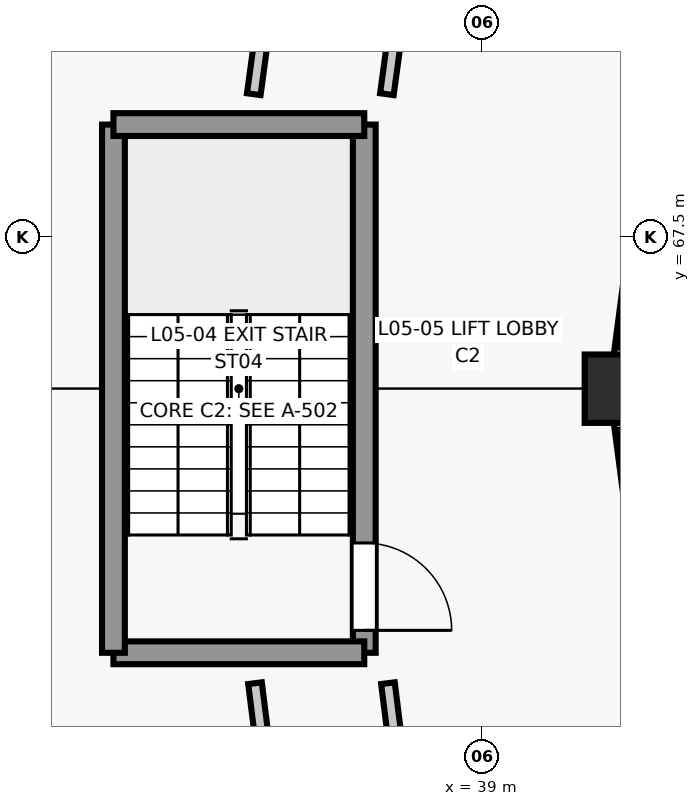
"""IFC4 building model, lengths in metres.
Left out: names, types, materials, properties, quantities, classifications, styles, units other than length and angle.
Written with IfcOpenShell. Run it as: python <this file> out.ifc"""

import sys

from ifc_helpers import new_model, si_unit, direction, frame, frame_2d, origin, origin_2d, place, context, subcontext, project, spatial, rectangle, circle, extrude, element, fill, save


model = new_model("IFC4")
c1 = context("Model", 3, precision=1e-05, world=origin(), true_north=direction((0.0, 1.0)))
c2 = subcontext(c1, "Body", "Model", "MODEL_VIEW")
j1 = project(units=[si_unit("LENGTHUNIT", "METRE"), si_unit("PLANEANGLEUNIT", "RADIAN")], contexts=[c1])
p1 = place(None, origin())
s1 = spatial("IfcSite", under=j1, at=p1, CompositionType="ELEMENT")
p2 = place(p1, origin())
s2 = spatial("IfcBuilding", under=s1, at=p2, CompositionType="ELEMENT")
p3 = place(p2, frame((0.0, 0.0, 20.4)))
s3 = spatial("IfcBuildingStorey", under=s2, at=p3, CompositionType="ELEMENT", Elevation=20.4)
p4 = place(p3, frame((40.8, 65.5, 0.0), z_axis=(0.0, 0.0, 1.0), x_axis=(1.0, 0.0, 0.0)))
e1 = element("IfcColumn", 1, at=p4, inside=s3, PredefinedType="COLUMN", context=c2, shape_type="SweptSolid", body=[
    extrude(circle(Radius=0.45, at=origin_2d()), origin(), (0.0, 0.0, 1.0), 3.9),
])
p5 = place(p3, frame((31.963, 65.975, 0.0), z_axis=(0.0, 0.0, 1.0), x_axis=(0.130513242145, 0.991446566197, 0.0)))
e2 = element("IfcWall", 2, at=p5, inside=s3, PredefinedType="STANDARD", context=c2, shape_type="SweptSolid", body=[
    extrude(rectangle(XDim=11.076, YDim=0.28, at=frame_2d((5.538, 0.0))), origin(), (0.0, 0.0, 1.0), 0.82),
])
p6 = place(p3, frame((42.031, 74.853, 0.0), z_axis=(0.0, 0.0, 1.0), x_axis=(-0.130549698469, -0.991441766434, 0.0)))
e3 = element("IfcWall", 3, at=p6, inside=s3, PredefinedType="STANDARD", context=c2, shape_type="SweptSolid", body=[
    extrude(rectangle(XDim=9.156, YDim=0.25, at=frame_2d((4.578, 0.0))), origin(), (0.0, 0.0, 1.0), 0.82),
])
p7 = place(p3, frame((33.408, 54.044, 0.0), z_axis=(0.0, 0.0, 1.0), x_axis=(-0.130513242145, 0.991446566197, 0.0)))
e4 = element("IfcWall", 4, at=p7, inside=s3, PredefinedType="STANDARD", context=c2, shape_type="SweptSolid", body=[
    extrude(rectangle(XDim=11.076, YDim=0.28, at=frame_2d((5.538, 0.0))), origin(), (0.0, 0.0, 1.0), 2.846),
])
p8 = place(p7, frame((4.163, 0.0, 0.85)))
e5 = element("IfcOpeningElement", 5, at=p8, cuts=e4, PredefinedType="OPENING", context=c2, shape_type="SweptSolid", body=[
    extrude(rectangle(XDim=2.75, YDim=1.75, at=frame_2d((1.375, 0.875))), frame((0.0, 0.15, 0.0), z_axis=(0.0, -1.0, 0.0), x_axis=(1.0, 0.0, 0.0)), (0.0, 0.0, 1.0), 0.3),
])
p9 = place(p3, frame((40.836, 65.225, 0.0), z_axis=(0.0, 0.0, 1.0), x_axis=(0.130549698469, -0.991441766434, 0.0)))
e6 = element("IfcWall", 6, at=p9, inside=s3, PredefinedType="STANDARD", context=c2, shape_type="SweptSolid", body=[
    extrude(rectangle(XDim=9.156, YDim=0.25, at=frame_2d((4.578, 0.0))), origin(), (0.0, 0.0, 1.0), 0.82),
])
p10 = place(p3, frame((37.45, 68.975, 0.0), z_axis=(0.0, 0.0, 1.0), x_axis=(0.0, -1.0, 0.0)))
e7 = element("IfcWall", 7, at=p10, inside=s3, PredefinedType="SHEAR", context=c2, shape_type="SweptSolid", body=[
    extrude(rectangle(XDim=6.95, YDim=0.3, at=frame_2d((3.475, 0.0))), origin(), (0.0, 0.0, 1.0), 3.9),
])
p11 = place(p10, frame((5.505, 0.0, 0.0)))
e8 = element("IfcOpeningElement", 8, at=p11, cuts=e7, PredefinedType="OPENING", context=c2, shape_type="SweptSolid", body=[
    extrude(rectangle(XDim=1.15, YDim=2.15, at=frame_2d((0.575, 1.075))), frame((0.0, 0.16, 0.0), z_axis=(0.0, -1.0, 0.0), x_axis=(1.0, 0.0, 0.0)), (0.0, 0.0, 1.0), 0.32),
])
p12 = place(p3, frame((37.45, 62.025, 0.0), z_axis=(0.0, 0.0, 1.0), x_axis=(-1.0, 0.0, 0.0)))
e9 = element("IfcWall", 9, at=p12, inside=s3, PredefinedType="SHEAR", context=c2, shape_type="SweptSolid", body=[
    extrude(rectangle(XDim=3.3, YDim=0.3, at=frame_2d((1.65, 0.0))), origin(), (0.0, 0.0, 1.0), 3.9),
])
p13 = place(p3, frame((34.15, 62.025, 0.0), z_axis=(0.0, 0.0, 1.0), x_axis=(0.0, 1.0, 0.0)))
e10 = element("IfcWall", 10, at=p13, inside=s3, PredefinedType="SHEAR", context=c2, shape_type="SweptSolid", body=[
    extrude(rectangle(XDim=6.95, YDim=0.3, at=frame_2d((3.475, 0.0))), origin(), (0.0, 0.0, 1.0), 3.9),
])
p14 = place(p3, frame((34.15, 68.975, 0.0), z_axis=(0.0, 0.0, 1.0), x_axis=(1.0, 0.0, 0.0)))
e11 = element("IfcWall", 11, at=p14, inside=s3, PredefinedType="SHEAR", context=c2, shape_type="SweptSolid", body=[
    extrude(rectangle(XDim=3.3, YDim=0.3, at=frame_2d((1.65, 0.0))), origin(), (0.0, 0.0, 1.0), 3.9),
])
p15 = place(p3, frame((36.976, 76.602, 0.0), z_axis=(0.0, 0.0, 1.0), x_axis=(-0.134237757742, -0.990949153285, 0.0)))
e12 = element("IfcWall", 12, at=p15, inside=s3, PredefinedType="PARTITIONING", context=c2, shape_type="SweptSolid", body=[
    extrude(rectangle(XDim=7.293, YDim=0.18, at=frame_2d((3.646, 0.0))), origin(), (0.0, 0.0, 1.0), 3.675),
])
p16 = place(p15, frame((3.122, 0.0, 0.0)))
e13 = element("IfcOpeningElement", 13, at=p16, cuts=e12, PredefinedType="OPENING", context=c2, shape_type="SweptSolid", body=[
    extrude(rectangle(XDim=1.05, YDim=2.1, at=frame_2d((0.525, 1.05))), frame((0.0, 0.1, 0.0), z_axis=(0.0, -1.0, 0.0), x_axis=(1.0, 0.0, 0.0)), (0.0, 0.0, 1.0), 0.2),
])
p17 = place(p3, frame((38.665, 76.145, 0.0), z_axis=(0.0, 0.0, 1.0), x_axis=(-0.134223309436, -0.990951110401, 0.0)))
e14 = element("IfcWall", 14, at=p17, inside=s3, PredefinedType="PARTITIONING", context=c2, shape_type="SweptSolid", body=[
    extrude(rectangle(XDim=6.832, YDim=0.18, at=frame_2d((3.416, 0.0))), origin(), (0.0, 0.0, 1.0), 3.675),
])
p18 = place(p17, frame((2.816, 0.0, 0.0)))
e15 = element("IfcOpeningElement", 15, at=p18, cuts=e14, PredefinedType="OPENING", context=c2, shape_type="SweptSolid", body=[
    extrude(rectangle(XDim=1.2, YDim=2.15, at=frame_2d((0.6, 1.075))), frame((0.0, 0.1, 0.0), z_axis=(0.0, -1.0, 0.0), x_axis=(1.0, 0.0, 0.0)), (0.0, 0.0, 1.0), 0.2),
])
p19 = place(p3, frame((36.013, 61.625, 0.0), z_axis=(0.0, 0.0, 1.0), x_axis=(0.124332118041, -0.992240658522, 0.0)))
e16 = element("IfcWall", 16, at=p19, inside=s3, PredefinedType="PARTITIONING", context=c2, shape_type="SweptSolid", body=[
    extrude(rectangle(XDim=6.871, YDim=0.18, at=frame_2d((3.435, 0.0))), origin(), (0.0, 0.0, 1.0), 3.675),
])
p20 = place(p19, frame((2.685, 0.0, 0.0)))
e17 = element("IfcOpeningElement", 17, at=p20, cuts=e16, PredefinedType="OPENING", context=c2, shape_type="SweptSolid", body=[
    extrude(rectangle(XDim=1.5, YDim=2.15, at=frame_2d((0.75, 1.075))), frame((0.0, 0.1, 0.0), z_axis=(0.0, -1.0, 0.0), x_axis=(1.0, 0.0, 0.0)), (0.0, 0.0, 1.0), 0.2),
])
p21 = place(p3, frame((37.762, 61.625, 0.0), z_axis=(0.0, 0.0, 1.0), x_axis=(0.12432926931, -0.992241015476, 0.0)))
e18 = element("IfcWall", 18, at=p21, inside=s3, PredefinedType="PARTITIONING", context=c2, shape_type="SweptSolid", body=[
    extrude(rectangle(XDim=6.427, YDim=0.18, at=frame_2d((3.213, 0.0))), origin(), (0.0, 0.0, 1.0), 3.675),
])
p22 = place(p21, frame((2.489, 0.0, 0.0)))
e19 = element("IfcOpeningElement", 19, at=p22, cuts=e18, PredefinedType="OPENING", context=c2, shape_type="SweptSolid", body=[
    extrude(rectangle(XDim=1.45, YDim=2.2, at=frame_2d((0.725, 1.1))), frame((0.0, 0.1, 0.0), z_axis=(0.0, -1.0, 0.0), x_axis=(1.0, 0.0, 0.0)), (0.0, 0.0, 1.0), 0.2),
])
p23 = place(p11, origin())
e20 = element("IfcDoor", 20, at=p23, inside=s3, OperationType="SINGLE_SWING_RIGHT", PredefinedType="DOOR", context=c2, shape_type="SweptSolid", body=[
    extrude(rectangle(XDim=1.15, YDim=2.15, at=frame_2d((0.575, 1.075))), frame((0.0, 0.025, 0.0), z_axis=(0.0, -1.0, 0.0), x_axis=(1.0, 0.0, 0.0)), (0.0, 0.0, 1.0), 0.05),
])
fill(e8, e20)
save(model, sys.argv[1])
